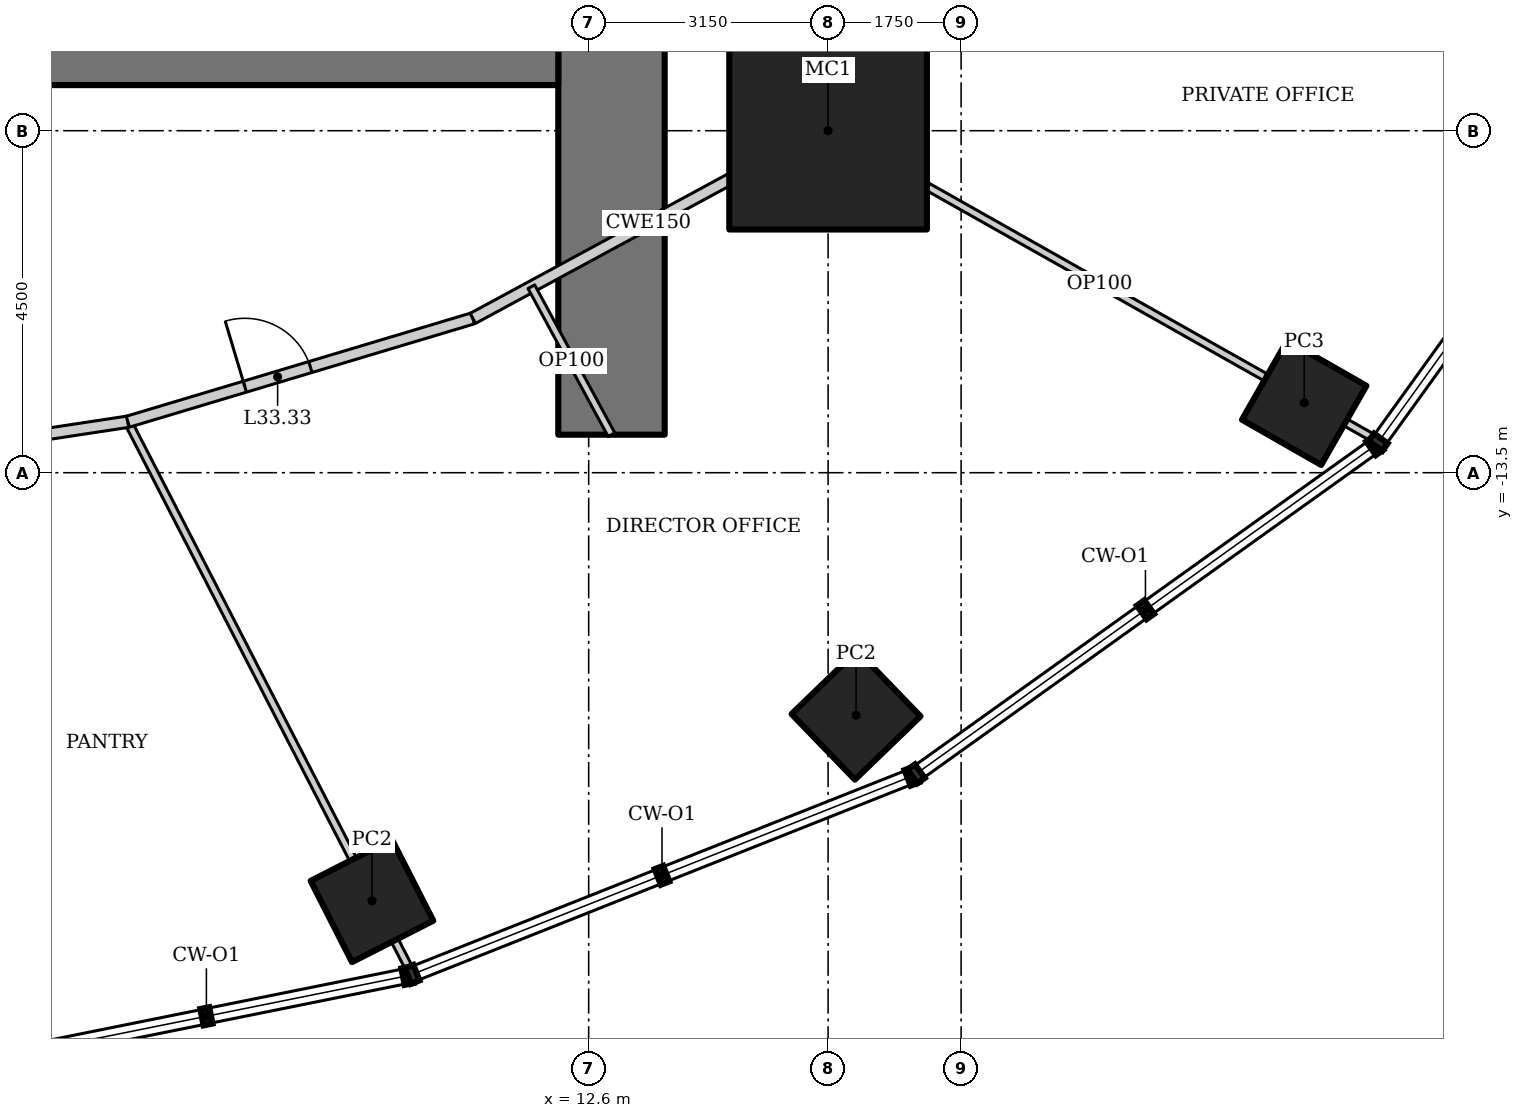
"""IFC4 building model, lengths in metres.
Left out: names, types, materials, properties, quantities, classifications, styles, units other than length and angle.
Written with IfcOpenShell. Run it as: python <this file> out.ifc"""

import sys

from ifc_helpers import new_model, si_unit, direction, frame, frame_2d, origin, origin_2d, place, context, subcontext, project, spatial, rectangle, hollow_rectangle, extrude, element, fill, save


model = new_model("IFC4")
c1 = context("Model", 3, precision=1e-05, world=origin(), true_north=direction((0.0, 1.0)))
c2 = subcontext(c1, "Body", "Model", "MODEL_VIEW")
j1 = project(units=[si_unit("LENGTHUNIT", "METRE"), si_unit("PLANEANGLEUNIT", "RADIAN")], contexts=[c1])
p1 = place(None, origin())
s1 = spatial("IfcSite", under=j1, at=p1, CompositionType="ELEMENT")
p2 = place(p1, origin())
s2 = spatial("IfcBuilding", under=s1, at=p2, CompositionType="ELEMENT")
p3 = place(p2, frame((0.0, 0.0, 142.6)))
s3 = spatial("IfcBuildingStorey", under=s2, at=p3, CompositionType="ELEMENT", Elevation=142.6)
p4 = place(p3, frame((15.75, -9.0, 0.0), z_axis=(0.0, 0.0, 1.0), x_axis=(1.0, 0.0, 0.0)))
e1 = element("IfcColumn", 1, at=p4, inside=s3, PredefinedType="COLUMN", context=c2, shape_type="SweptSolid", body=[
    extrude(hollow_rectangle(XDim=2.6, YDim=2.6, WallThickness=0.13, at=origin_2d()), origin(), (0.0, 0.0, 1.0), 4.2),
])
for number, where, z_axis, x_axis in (
    (2, (9.749, -19.133, 0.0), (0.0, 0.0, 1.0), (0.891, 0.454, 0.0)),
    (3, (16.118, -16.69, 0.0), (0.0, 0.0, 1.0), (0.719, 0.695, 0.0)),
):
    element("IfcColumn", number, at=place(p3, frame(where, z_axis=z_axis, x_axis=x_axis)), inside=s3, PredefinedType="COLUMN", context=c2, shape_type="SweptSolid", body=[
        extrude(hollow_rectangle(XDim=1.2, YDim=1.2, WallThickness=0.1, at=origin_2d()), origin(), (0.0, 0.0, 1.0), 4.2),
    ])
p5 = place(p3, frame((22.014, -12.579, 0.0), z_axis=(0.0, 0.0, 1.0), x_axis=(0.496139221777, 0.86824298017, 0.0)))
e4 = element("IfcColumn", 4, at=p5, inside=s3, PredefinedType="COLUMN", context=c2, shape_type="SweptSolid", body=[
    extrude(hollow_rectangle(XDim=1.2, YDim=1.2, WallThickness=0.12, at=origin_2d()), origin(), (0.0, 0.0, 1.0), 4.2),
])
p6 = place(p3, frame((12.9, -13.0, 0.0), z_axis=(0.0, 0.0, 1.0), x_axis=(0.0, 1.0, 0.0)))
e5 = element("IfcWall", 5, at=p6, inside=s3, PredefinedType="SHEAR", context=c2, shape_type="SweptSolid", body=[
    extrude(rectangle(XDim=26.0, YDim=1.4, at=frame_2d((13.0, 0.0))), origin(), (0.0, 0.0, 1.0), 4.2),
])
p7 = place(p6, frame((12.1, 0.0, 0.0)))
e6 = element("IfcOpeningElement", 6, at=p7, cuts=e5, PredefinedType="OPENING", context=c2, shape_type="SweptSolid", body=[
    extrude(rectangle(XDim=1.8, YDim=2.1, at=frame_2d((0.9, 1.05))), frame((0.0, 0.71, 0.0), z_axis=(0.0, -1.0, 0.0), x_axis=(1.0, 0.0, 0.0)), (0.0, 0.0, 1.0), 1.42),
])
p8 = place(p3, frame((-12.2, -7.6, 0.0), z_axis=(0.0, 0.0, 1.0), x_axis=(1.0, 0.0, 0.0)))
e7 = element("IfcWall", 7, at=p8, inside=s3, PredefinedType="SHEAR", context=c2, shape_type="SweptSolid", body=[
    extrude(rectangle(XDim=24.4, YDim=1.6, at=frame_2d((12.2, 0.0))), origin(), (0.0, 0.0, 1.0), 4.2),
])
p9 = place(p3, frame((10.253, -20.052, 0.0), z_axis=(0.0, 0.0, 1.0), x_axis=(-0.457535449567, 0.889191381194, 0.0)))
e8 = element("IfcWall", 8, at=p9, inside=s3, PredefinedType="PARTITIONING", context=c2, shape_type="SweptSolid", body=[
    extrude(rectangle(XDim=8.123, YDim=0.1, at=frame_2d((4.061, 0.0))), origin(), (0.0, 0.0, 1.0), 3.349),
])
p10 = place(p3, frame((22.949, -13.059, 0.0), z_axis=(0.0, 0.0, 1.0), x_axis=(-0.871079462611, 0.491142107558, 0.0)))
e9 = element("IfcWall", 9, at=p10, inside=s3, PredefinedType="PARTITIONING", context=c2, shape_type="SweptSolid", body=[
    extrude(rectangle(XDim=8.327, YDim=0.1, at=frame_2d((4.164, 0.0))), origin(), (0.0, 0.0, 1.0), 3.45),
])
p11 = place(p3, frame((3.083, -13.354, 0.0), z_axis=(0.0, 0.0, 1.0), x_axis=(0.988668719464, 0.150113833987, 0.0)))
e10 = element("IfcWall", 10, at=p11, inside=s3, PredefinedType="PARTITIONING", context=c2, shape_type="SweptSolid", body=[
    extrude(rectangle(XDim=3.493, YDim=0.15, at=frame_2d((1.747, 0.0))), origin(), (0.0, 0.0, 1.0), 4.05),
])
p12 = place(p11, frame((0.15, 0.0, 0.0)))
e11 = element("IfcOpeningElement", 11, at=p12, cuts=e10, PredefinedType="OPENING", context=c2, shape_type="SweptSolid", body=[
    extrude(rectangle(XDim=0.9, YDim=2.1, at=frame_2d((0.45, 1.05))), frame((0.0, 0.085, 0.0), z_axis=(0.0, -1.0, 0.0), x_axis=(1.0, 0.0, 0.0)), (0.0, 0.0, 1.0), 0.17),
])
p13 = place(p3, frame((6.537, -12.829, 0.0), z_axis=(0.0, 0.0, 1.0), x_axis=(0.957933992798, 0.286988615527, 0.0)))
e12 = element("IfcWall", 12, at=p13, inside=s3, PredefinedType="PARTITIONING", context=c2, shape_type="SweptSolid", body=[
    extrude(rectangle(XDim=4.738, YDim=0.15, at=frame_2d((2.369, 0.0))), origin(), (0.0, 0.0, 1.0), 4.05),
])
p14 = place(p13, frame((1.607, 0.0, 0.0)))
e13 = element("IfcOpeningElement", 13, at=p14, cuts=e12, PredefinedType="OPENING", context=c2, shape_type="SweptSolid", body=[
    extrude(rectangle(XDim=0.9, YDim=2.1, at=frame_2d((0.45, 1.05))), frame((0.0, 0.085, 0.0), z_axis=(0.0, -1.0, 0.0), x_axis=(1.0, 0.0, 0.0)), (0.0, 0.0, 1.0), 0.17),
])
p15 = place(p3, frame((11.076, -11.469, 0.0), z_axis=(0.0, 0.0, 1.0), x_axis=(0.879436285334, 0.476016617397, 0.0)))
e14 = element("IfcWall", 14, at=p15, inside=s3, PredefinedType="PARTITIONING", context=c2, shape_type="SweptSolid", body=[
    extrude(rectangle(XDim=5.253, YDim=0.15, at=frame_2d((2.626, 0.0))), origin(), (0.0, 0.0, 1.0), 4.05),
])
p16 = place(p3, frame((15.696, -8.969, 0.0), z_axis=(0.0, 0.0, 1.0), x_axis=(0.688797257101, 0.72495402517, 0.0)))
e15 = element("IfcWall", 15, at=p16, inside=s3, PredefinedType="PARTITIONING", context=c2, shape_type="SweptSolid", body=[
    extrude(rectangle(XDim=5.638, YDim=0.15, at=frame_2d((2.819, 0.0))), origin(), (0.0, 0.0, 1.0), 4.05),
])
p17 = place(p16, frame((4.588, 0.0, 0.0)))
e16 = element("IfcOpeningElement", 16, at=p17, cuts=e15, PredefinedType="OPENING", context=c2, shape_type="SweptSolid", body=[
    extrude(rectangle(XDim=0.9, YDim=2.1, at=frame_2d((0.45, 1.05))), frame((0.0, 0.085, 0.0), z_axis=(0.0, -1.0, 0.0), x_axis=(1.0, 0.0, 0.0)), (0.0, 0.0, 1.0), 0.17),
])
p18 = place(p3, frame((12.9, -13.0, 0.0), z_axis=(0.0, 0.0, 1.0), x_axis=(-0.475998959765, 0.879445842734, 0.0)))
e17 = element("IfcWall", 17, at=p18, inside=s3, PredefinedType="PARTITIONING", context=c2, shape_type="SweptSolid", body=[
    extrude(rectangle(XDim=2.214, YDim=0.1, at=frame_2d((1.107, 0.0))), origin(), (0.0, 0.0, 1.0), 4.05),
])
p19 = place(p14, origin())
e18 = element("IfcDoor", 18, at=p19, inside=s3, OperationType="SINGLE_SWING_LEFT", PredefinedType="DOOR", context=c2, shape_type="SweptSolid", body=[
    extrude(rectangle(XDim=0.9, YDim=2.1, at=frame_2d((0.45, 1.05))), frame((0.0, 0.025, 0.0), z_axis=(0.0, -1.0, 0.0), x_axis=(1.0, 0.0, 0.0)), (0.0, 0.0, 1.0), 0.05),
])
fill(e13, e18)
save(model, sys.argv[1])
